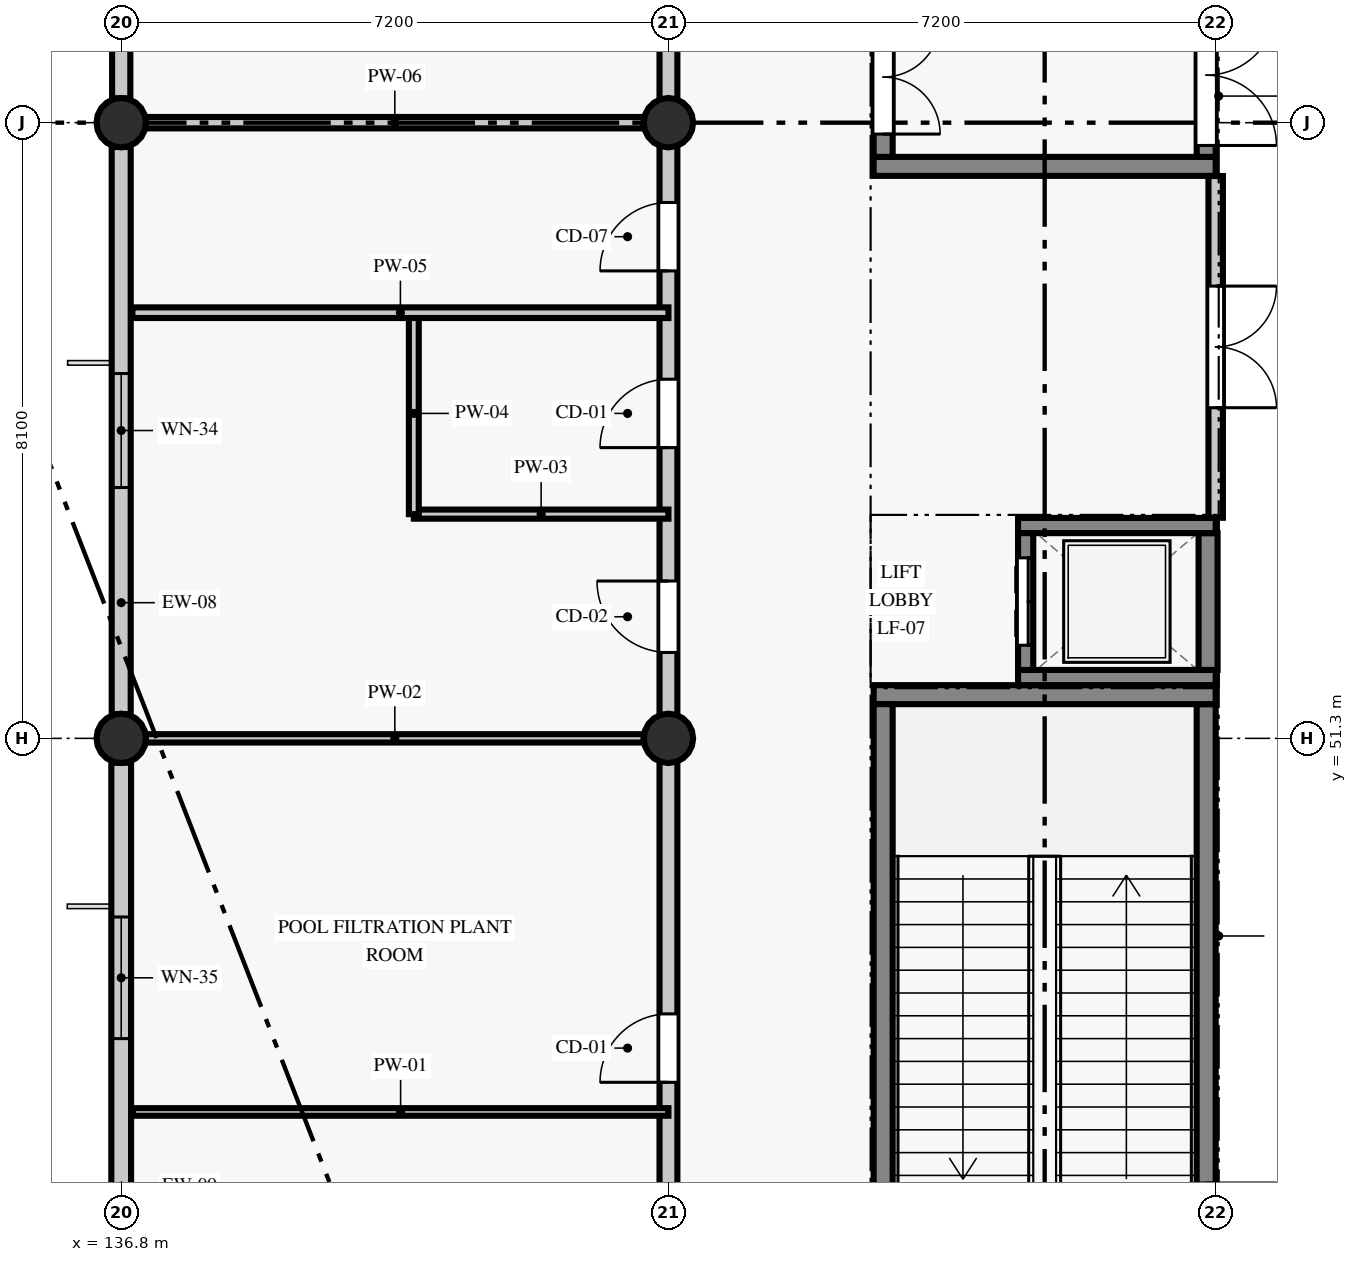
"""IFC4 building model, lengths in metres.
Left out: names, types, materials, properties, quantities, classifications, styles, units other than length and angle.
Written with IfcOpenShell. Run it as: python <this file> out.ifc"""

import sys

from ifc_helpers import new_model, si_unit, direction, frame, frame_2d, origin, origin_2d, place, context, subcontext, project, spatial, rectangle, circle, extrude, element, fill, save


model = new_model("IFC4")
c1 = context("Model", 3, precision=1e-05, world=origin(), true_north=direction((0.0, 1.0)))
c2 = subcontext(c1, "Body", "Model", "MODEL_VIEW")
j1 = project(units=[si_unit("LENGTHUNIT", "METRE"), si_unit("PLANEANGLEUNIT", "RADIAN")], contexts=[c1])
p1 = place(None, origin())
s1 = spatial("IfcSite", under=j1, at=p1, CompositionType="ELEMENT")
p2 = place(p1, origin())
s2 = spatial("IfcBuilding", under=s1, at=p2, CompositionType="ELEMENT")
p3 = place(p2, origin())
s3 = spatial("IfcBuildingStorey", under=s2, at=p3, CompositionType="ELEMENT", Elevation=0.0)
for number, where, z_axis, x_axis in (
    (1, (136.8, 51.3, 0.0), (0.0, 0.0, 1.0), (1.0, 0.0, 0.0)),
    (2, (136.8, 59.4, 0.0), (0.0, 0.0, 1.0), (1.0, 0.0, 0.0)),
    (3, (144.0, 51.3, 0.0), (0.0, 0.0, 1.0), (1.0, 0.0, 0.0)),
    (4, (144.0, 59.4, 0.0), (0.0, 0.0, 1.0), (1.0, 0.0, 0.0)),
):
    element("IfcColumn", number, at=place(p3, frame(where, z_axis=z_axis, x_axis=x_axis)), inside=s3, PredefinedType="COLUMN", context=c2, shape_type="SweptSolid", body=[
        extrude(circle(Radius=0.325, at=origin_2d()), origin(), (0.0, 0.0, 1.0), 4.565),
    ])
p4 = place(p3, frame((151.2, 54.202, 0.0), z_axis=(0.0, 0.0, 1.0), x_axis=(0.0, 1.0, 0.0)))
e5 = element("IfcWall", 5, at=p4, inside=s3, PredefinedType="STANDARD", context=c2, shape_type="SweptSolid", body=[
    extrude(rectangle(XDim=4.496, YDim=0.19, at=frame_2d((2.248, 0.0))), origin(), (0.0, 0.0, 1.0), 4.565),
])
p5 = place(p4, frame((1.448, 0.0, 0.0)))
e6 = element("IfcOpeningElement", 6, at=p5, cuts=e5, PredefinedType="OPENING", context=c2, shape_type="SweptSolid", body=[
    extrude(rectangle(XDim=1.6, YDim=2.2, at=frame_2d((0.8, 1.1))), frame((0.0, 0.105, 0.0), z_axis=(0.0, -1.0, 0.0), x_axis=(1.0, 0.0, 0.0)), (0.0, 0.0, 1.0), 0.21),
])
p6 = place(p3, frame((136.8, 67.18, 0.0), z_axis=(0.0, 0.0, 1.0), x_axis=(0.0, -1.0, 0.0)))
e7 = element("IfcWall", 7, at=p6, inside=s3, PredefinedType="STANDARD", context=c2, shape_type="SweptSolid", body=[
    extrude(rectangle(XDim=7.46, YDim=0.24, at=frame_2d((3.73, 0.0))), origin(), (0.0, 0.0, 1.0), 3.915),
])
p7 = place(p6, frame((3.03, 0.0, 0.9)))
e8 = element("IfcOpeningElement", 8, at=p7, cuts=e7, PredefinedType="OPENING", context=c2, shape_type="SweptSolid", body=[
    extrude(rectangle(XDim=1.4, YDim=1.66, at=frame_2d((0.7, 0.83))), frame((0.0, 0.13, 0.0), z_axis=(0.0, -1.0, 0.0), x_axis=(1.0, 0.0, 0.0)), (0.0, 0.0, 1.0), 0.26),
])
p8 = place(p3, frame((136.8, 59.08, 0.0), z_axis=(0.0, 0.0, 1.0), x_axis=(0.0, -1.0, 0.0)))
e9 = element("IfcWall", 9, at=p8, inside=s3, PredefinedType="STANDARD", context=c2, shape_type="SweptSolid", body=[
    extrude(rectangle(XDim=7.46, YDim=0.25, at=frame_2d((3.73, 0.0))), origin(), (0.0, 0.0, 1.0), 3.915),
])
p9 = place(p8, frame((2.98, 0.0, 0.9)))
e10 = element("IfcOpeningElement", 10, at=p9, cuts=e9, PredefinedType="OPENING", context=c2, shape_type="SweptSolid", body=[
    extrude(rectangle(XDim=1.5, YDim=1.66, at=frame_2d((0.75, 0.83))), frame((0.0, 0.135, 0.0), z_axis=(0.0, -1.0, 0.0), x_axis=(1.0, 0.0, 0.0)), (0.0, 0.0, 1.0), 0.27),
])
p10 = place(p3, frame((136.8, 50.98, 0.0), z_axis=(0.0, 0.0, 1.0), x_axis=(0.0, -1.0, 0.0)))
e11 = element("IfcWall", 11, at=p10, inside=s3, PredefinedType="STANDARD", context=c2, shape_type="SweptSolid", body=[
    extrude(rectangle(XDim=7.46, YDim=0.26, at=frame_2d((3.73, 0.0))), origin(), (0.0, 0.0, 1.0), 3.915),
])
p11 = place(p10, frame((2.03, 0.0, 0.9)))
e12 = element("IfcOpeningElement", 12, at=p11, cuts=e11, PredefinedType="OPENING", context=c2, shape_type="SweptSolid", body=[
    extrude(rectangle(XDim=1.6, YDim=1.66, at=frame_2d((0.8, 0.83))), frame((0.0, 0.14, 0.0), z_axis=(0.0, -1.0, 0.0), x_axis=(1.0, 0.0, 0.0)), (0.0, 0.0, 1.0), 0.28),
])
p12 = place(p3, frame((151.075, 43.45, 0.0), z_axis=(0.0, 0.0, 1.0), x_axis=(0.0, 1.0, 0.0)))
e13 = element("IfcWall", 13, at=p12, inside=s3, PredefinedType="SHEAR", context=c2, shape_type="SweptSolid", body=[
    extrude(rectangle(XDim=8.3, YDim=0.25, at=frame_2d((4.15, 0.0))), origin(), (0.0, 0.0, 1.0), 4.565),
])
p13 = place(p12, frame((0.15, 0.0, 0.0)))
e14 = element("IfcOpeningElement", 14, at=p13, cuts=e13, PredefinedType="OPENING", context=c2, shape_type="SweptSolid", body=[
    extrude(rectangle(XDim=1.85, YDim=2.2, at=frame_2d((0.925, 1.1))), frame((0.0, 0.135, 0.0), z_axis=(0.0, -1.0, 0.0), x_axis=(1.0, 0.0, 0.0)), (0.0, 0.0, 1.0), 0.27),
])
p14 = place(p3, frame((151.2, 51.875, 0.0), z_axis=(0.0, 0.0, 1.0), x_axis=(-1.0, 0.0, 0.0)))
e15 = element("IfcWall", 15, at=p14, inside=s3, PredefinedType="SHEAR", context=c2, shape_type="SweptSolid", body=[
    extrude(rectangle(XDim=4.5, YDim=0.25, at=frame_2d((2.25, 0.0))), origin(), (0.0, 0.0, 1.0), 4.565),
])
p15 = place(p3, frame((146.825, 51.75, 0.0), z_axis=(0.0, 0.0, 1.0), x_axis=(0.0, -1.0, 0.0)))
e16 = element("IfcWall", 16, at=p15, inside=s3, PredefinedType="SHEAR", context=c2, shape_type="SweptSolid", body=[
    extrude(rectangle(XDim=8.3, YDim=0.25, at=frame_2d((4.15, 0.0))), origin(), (0.0, 0.0, 1.0), 4.565),
])
p16 = place(p15, frame((6.5, 0.0, 0.0)))
e17 = element("IfcOpeningElement", 17, at=p16, cuts=e16, PredefinedType="OPENING", context=c2, shape_type="SweptSolid", body=[
    extrude(rectangle(XDim=1.5, YDim=2.15, at=frame_2d((0.75, 1.075))), frame((0.0, 0.135, 0.0), z_axis=(0.0, -1.0, 0.0), x_axis=(1.0, 0.0, 0.0)), (0.0, 0.0, 1.0), 0.27),
])
p17 = place(p3, frame((146.7, 58.825, 0.0), z_axis=(0.0, 0.0, 1.0), x_axis=(1.0, 0.0, 0.0)))
e18 = element("IfcWall", 18, at=p17, inside=s3, PredefinedType="SHEAR", context=c2, shape_type="SweptSolid", body=[
    extrude(rectangle(XDim=4.5, YDim=0.25, at=frame_2d((2.25, 0.0))), origin(), (0.0, 0.0, 1.0), 4.565),
])
p18 = place(p3, frame((151.075, 58.95, 0.0), z_axis=(0.0, 0.0, 1.0), x_axis=(0.0, 1.0, 0.0)))
e19 = element("IfcWall", 19, at=p18, inside=s3, PredefinedType="SHEAR", context=c2, shape_type="SweptSolid", body=[
    extrude(rectangle(XDim=8.3, YDim=0.25, at=frame_2d((4.15, 0.0))), origin(), (0.0, 0.0, 1.0), 4.565),
])
p19 = place(p18, frame((0.15, 0.0, 0.0)))
e20 = element("IfcOpeningElement", 20, at=p19, cuts=e19, PredefinedType="OPENING", context=c2, shape_type="SweptSolid", body=[
    extrude(rectangle(XDim=1.85, YDim=2.2, at=frame_2d((0.925, 1.1))), frame((0.0, 0.135, 0.0), z_axis=(0.0, -1.0, 0.0), x_axis=(1.0, 0.0, 0.0)), (0.0, 0.0, 1.0), 0.27),
])
p20 = place(p3, frame((146.825, 67.25, 0.0), z_axis=(0.0, 0.0, 1.0), x_axis=(0.0, -1.0, 0.0)))
e21 = element("IfcWall", 21, at=p20, inside=s3, PredefinedType="SHEAR", context=c2, shape_type="SweptSolid", body=[
    extrude(rectangle(XDim=8.3, YDim=0.25, at=frame_2d((4.15, 0.0))), origin(), (0.0, 0.0, 1.0), 4.565),
])
p21 = place(p20, frame((6.5, 0.0, 0.0)))
e22 = element("IfcOpeningElement", 22, at=p21, cuts=e21, PredefinedType="OPENING", context=c2, shape_type="SweptSolid", body=[
    extrude(rectangle(XDim=1.5, YDim=2.15, at=frame_2d((0.75, 1.075))), frame((0.0, 0.135, 0.0), z_axis=(0.0, -1.0, 0.0), x_axis=(1.0, 0.0, 0.0)), (0.0, 0.0, 1.0), 0.27),
])
p22 = place(p3, frame((148.6, 52.1, 0.0), z_axis=(0.0, 0.0, 1.0), x_axis=(1.0, 0.0, 0.0)))
e23 = element("IfcWall", 23, at=p22, inside=s3, PredefinedType="SHEAR", context=c2, shape_type="SweptSolid", body=[
    extrude(rectangle(XDim=2.6, YDim=0.2, at=frame_2d((1.3, 0.0))), origin(), (0.0, 0.0, 1.0), 4.565),
])
p23 = place(p3, frame((151.1, 52.2, 0.0), z_axis=(0.0, 0.0, 1.0), x_axis=(0.0, 1.0, 0.0)))
e24 = element("IfcWall", 24, at=p23, inside=s3, PredefinedType="SHEAR", context=c2, shape_type="SweptSolid", body=[
    extrude(rectangle(XDim=1.8, YDim=0.25, at=frame_2d((0.9, 0.0))), origin(), (0.0, 0.0, 1.0), 4.565),
])
p24 = place(p3, frame((151.2, 54.1, 0.0), z_axis=(0.0, 0.0, 1.0), x_axis=(-1.0, 0.0, 0.0)))
e25 = element("IfcWall", 25, at=p24, inside=s3, PredefinedType="SHEAR", context=c2, shape_type="SweptSolid", body=[
    extrude(rectangle(XDim=2.6, YDim=0.2, at=frame_2d((1.3, 0.0))), origin(), (0.0, 0.0, 1.0), 4.565),
])
p25 = place(p3, frame((148.7, 54.0, 0.0), z_axis=(0.0, 0.0, 1.0), x_axis=(0.0, -1.0, 0.0)))
e26 = element("IfcWall", 26, at=p25, inside=s3, PredefinedType="SHEAR", context=c2, shape_type="SweptSolid", body=[
    extrude(rectangle(XDim=1.8, YDim=0.2, at=frame_2d((0.9, 0.0))), origin(), (0.0, 0.0, 1.0), 4.565),
])
p26 = place(p25, frame((0.325, 0.0, 0.0)))
e27 = element("IfcOpeningElement", 27, at=p26, cuts=e26, PredefinedType="OPENING", context=c2, shape_type="SweptSolid", body=[
    extrude(rectangle(XDim=1.15, YDim=2.15, at=frame_2d((0.575, 1.075))), frame((0.0, 0.11, 0.0), z_axis=(0.0, -1.0, 0.0), x_axis=(1.0, 0.0, 0.0)), (0.0, 0.0, 1.0), 0.22),
])
p27 = place(p3, frame((144.0, 36.325, 0.0), z_axis=(0.0, 0.0, 1.0), x_axis=(0.0, 1.0, 0.0)))
e28 = element("IfcWall", 28, at=p27, inside=s3, PredefinedType="PARTITIONING", context=c2, shape_type="SweptSolid", body=[
    extrude(rectangle(XDim=38.95, YDim=0.235, at=frame_2d((19.475, 0.0))), origin(), (0.0, 0.0, 1.0), 4.115),
])
p28 = place(p27, frame((2.045, 0.0, 0.0)))
e29 = element("IfcOpeningElement", 29, at=p28, cuts=e28, PredefinedType="OPENING", context=c2, shape_type="SweptSolid", body=[
    extrude(rectangle(XDim=1.62, YDim=2.22, at=frame_2d((0.81, 1.11))), frame((0.0, 0.127, 0.0), z_axis=(0.0, -1.0, 0.0), x_axis=(1.0, 0.0, 0.0)), (0.0, 0.0, 1.0), 0.255),
])
p29 = place(p27, frame((10.45, 0.0, 0.0)))
e30 = element("IfcOpeningElement", 30, at=p29, cuts=e28, PredefinedType="OPENING", context=c2, shape_type="SweptSolid", body=[
    extrude(rectangle(XDim=0.9, YDim=2.08, at=frame_2d((0.45, 1.04))), frame((0.0, 0.127, 0.0), z_axis=(0.0, -1.0, 0.0), x_axis=(1.0, 0.0, 0.0)), (0.0, 0.0, 1.0), 0.255),
])
p30 = place(p27, frame((16.105, 0.0, 0.0)))
e31 = element("IfcOpeningElement", 31, at=p30, cuts=e28, PredefinedType="OPENING", context=c2, shape_type="SweptSolid", body=[
    extrude(rectangle(XDim=0.94, YDim=2.08, at=frame_2d((0.47, 1.04))), frame((0.0, 0.127, 0.0), z_axis=(0.0, -1.0, 0.0), x_axis=(1.0, 0.0, 0.0)), (0.0, 0.0, 1.0), 0.255),
])
p31 = place(p27, frame((18.8, 0.0, 0.0)))
e32 = element("IfcOpeningElement", 32, at=p31, cuts=e28, PredefinedType="OPENING", context=c2, shape_type="SweptSolid", body=[
    extrude(rectangle(XDim=0.9, YDim=2.08, at=frame_2d((0.45, 1.04))), frame((0.0, 0.127, 0.0), z_axis=(0.0, -1.0, 0.0), x_axis=(1.0, 0.0, 0.0)), (0.0, 0.0, 1.0), 0.255),
])
p32 = place(p27, frame((21.125, 0.0, 0.0)))
e33 = element("IfcOpeningElement", 33, at=p32, cuts=e28, PredefinedType="OPENING", context=c2, shape_type="SweptSolid", body=[
    extrude(rectangle(XDim=0.9, YDim=2.13, at=frame_2d((0.45, 1.065))), frame((0.0, 0.127, 0.0), z_axis=(0.0, -1.0, 0.0), x_axis=(1.0, 0.0, 0.0)), (0.0, 0.0, 1.0), 0.255),
])
p33 = place(p27, frame((25.925, 0.0, 0.0)))
e34 = element("IfcOpeningElement", 34, at=p33, cuts=e28, PredefinedType="OPENING", context=c2, shape_type="SweptSolid", body=[
    extrude(rectangle(XDim=1.68, YDim=2.24, at=frame_2d((0.84, 1.12))), frame((0.0, 0.127, 0.0), z_axis=(0.0, -1.0, 0.0), x_axis=(1.0, 0.0, 0.0)), (0.0, 0.0, 1.0), 0.255),
])
p34 = place(p27, frame((34.515, 0.0, 0.0)))
e35 = element("IfcOpeningElement", 35, at=p34, cuts=e28, PredefinedType="OPENING", context=c2, shape_type="SweptSolid", body=[
    extrude(rectangle(XDim=1.06, YDim=2.08, at=frame_2d((0.53, 1.04))), frame((0.0, 0.127, 0.0), z_axis=(0.0, -1.0, 0.0), x_axis=(1.0, 0.0, 0.0)), (0.0, 0.0, 1.0), 0.255),
])
p35 = place(p3, frame((136.952, 46.385, 0.0), z_axis=(0.0, 0.0, 1.0), x_axis=(1.0, 0.0, 0.0)))
e36 = element("IfcWall", 36, at=p35, inside=s3, PredefinedType="PARTITIONING", context=c2, shape_type="SweptSolid", body=[
    extrude(rectangle(XDim=7.048, YDim=0.1, at=frame_2d((3.524, 0.0))), origin(), (0.0, 0.0, 1.0), 4.565),
])
p36 = place(p3, frame((137.125, 51.3, 0.0), z_axis=(0.0, 0.0, 1.0), x_axis=(1.0, 0.0, 0.0)))
e37 = element("IfcWall", 37, at=p36, inside=s3, PredefinedType="PARTITIONING", context=c2, shape_type="SweptSolid", body=[
    extrude(rectangle(XDim=6.55, YDim=0.11, at=frame_2d((3.275, 0.0))), origin(), (0.0, 0.0, 1.0), 3.865),
])
p37 = place(p3, frame((140.65, 54.25, 0.0), z_axis=(0.0, 0.0, 1.0), x_axis=(1.0, 0.0, 0.0)))
e38 = element("IfcWall", 38, at=p37, inside=s3, PredefinedType="PARTITIONING", context=c2, shape_type="SweptSolid", body=[
    extrude(rectangle(XDim=3.35, YDim=0.12, at=frame_2d((1.675, 0.0))), origin(), (0.0, 0.0, 1.0), 4.565),
])
p38 = place(p3, frame((140.65, 54.25, 0.0), z_axis=(0.0, 0.0, 1.0), x_axis=(0.0, 1.0, 0.0)))
e39 = element("IfcWall", 39, at=p38, inside=s3, PredefinedType="PARTITIONING", context=c2, shape_type="SweptSolid", body=[
    extrude(rectangle(XDim=2.65, YDim=0.13, at=frame_2d((1.325, 0.0))), origin(), (0.0, 0.0, 1.0), 4.205),
])
p39 = place(p3, frame((136.947, 56.9, 0.0), z_axis=(0.0, 0.0, 1.0), x_axis=(1.0, 0.0, 0.0)))
e40 = element("IfcWall", 40, at=p39, inside=s3, PredefinedType="PARTITIONING", context=c2, shape_type="SweptSolid", body=[
    extrude(rectangle(XDim=7.053, YDim=0.14, at=frame_2d((3.526, 0.0))), origin(), (0.0, 0.0, 1.0), 4.565),
])
p40 = place(p3, frame((137.125, 59.4, 0.0), z_axis=(0.0, 0.0, 1.0), x_axis=(1.0, 0.0, 0.0)))
e41 = element("IfcWall", 41, at=p40, inside=s3, PredefinedType="PARTITIONING", context=c2, shape_type="SweptSolid", body=[
    extrude(rectangle(XDim=6.55, YDim=0.15, at=frame_2d((3.275, 0.0))), origin(), (0.0, 0.0, 1.0), 3.865),
])
p41 = place(p5, frame((1.6, 0.0, 0.0), z_axis=(0.0, 0.0, 1.0), x_axis=(-1.0, 0.0, 0.0)))
e42 = element("IfcDoor", 42, at=p41, inside=s3, OperationType="DOUBLE_DOOR_SINGLE_SWING", PredefinedType="DOOR", context=c2, shape_type="SweptSolid", body=[
    extrude(rectangle(XDim=1.6, YDim=2.2, at=frame_2d((0.8, 1.1))), frame((0.0, 0.025, 0.0), z_axis=(0.0, -1.0, 0.0), x_axis=(1.0, 0.0, 0.0)), (0.0, 0.0, 1.0), 0.05),
])
fill(e6, e42)
p42 = place(p9, origin())
e43 = element("IfcWindow", 43, at=p42, inside=s3, PartitioningType="SINGLE_PANEL", PredefinedType="WINDOW", context=c2, shape_type="SweptSolid", body=[
    extrude(rectangle(XDim=1.5, YDim=1.66, at=frame_2d((0.75, 0.83))), frame((0.0, 0.03, 0.0), z_axis=(0.0, -1.0, 0.0), x_axis=(1.0, 0.0, 0.0)), (0.0, 0.0, 1.0), 0.06),
])
fill(e10, e43)
p43 = place(p11, origin())
e44 = element("IfcWindow", 44, at=p43, inside=s3, PartitioningType="SINGLE_PANEL", PredefinedType="WINDOW", context=c2, shape_type="SweptSolid", body=[
    extrude(rectangle(XDim=1.6, YDim=1.66, at=frame_2d((0.8, 0.83))), frame((0.0, 0.03, 0.0), z_axis=(0.0, -1.0, 0.0), x_axis=(1.0, 0.0, 0.0)), (0.0, 0.0, 1.0), 0.06),
])
fill(e12, e44)
p44 = place(p19, frame((1.85, 0.0, 0.0), z_axis=(0.0, 0.0, 1.0), x_axis=(-1.0, 0.0, 0.0)))
e45 = element("IfcDoor", 45, at=p44, inside=s3, OperationType="DOUBLE_DOOR_SINGLE_SWING", PredefinedType="DOOR", context=c2, shape_type="SweptSolid", body=[
    extrude(rectangle(XDim=1.85, YDim=2.2, at=frame_2d((0.925, 1.1))), frame((0.0, 0.025, 0.0), z_axis=(0.0, -1.0, 0.0), x_axis=(1.0, 0.0, 0.0)), (0.0, 0.0, 1.0), 0.05),
])
fill(e20, e45)
p45 = place(p21, origin())
e46 = element("IfcDoor", 46, at=p45, inside=s3, OperationType="DOUBLE_DOOR_SINGLE_SWING", PredefinedType="DOOR", context=c2, shape_type="SweptSolid", body=[
    extrude(rectangle(XDim=1.5, YDim=2.15, at=frame_2d((0.75, 1.075))), frame((0.0, 0.025, 0.0), z_axis=(0.0, -1.0, 0.0), x_axis=(1.0, 0.0, 0.0)), (0.0, 0.0, 1.0), 0.05),
])
fill(e22, e46)
p46 = place(p26, frame((1.15, 0.0, 0.0), z_axis=(0.0, 0.0, 1.0), x_axis=(-1.0, 0.0, 0.0)))
e47 = element("IfcDoor", 47, at=p46, inside=s3, OperationType="DOUBLE_DOOR_SLIDING", PredefinedType="DOOR", context=c2, shape_type="SweptSolid", body=[
    extrude(rectangle(XDim=1.15, YDim=2.15, at=frame_2d((0.575, 1.075))), frame((0.0, 0.025, 0.0), z_axis=(0.0, -1.0, 0.0), x_axis=(1.0, 0.0, 0.0)), (0.0, 0.0, 1.0), 0.05),
])
fill(e27, e47)
p47 = place(p29, origin())
e48 = element("IfcDoor", 48, at=p47, inside=s3, OperationType="SINGLE_SWING_LEFT", PredefinedType="DOOR", context=c2, shape_type="SweptSolid", body=[
    extrude(rectangle(XDim=0.9, YDim=2.08, at=frame_2d((0.45, 1.04))), frame((0.0, 0.025, 0.0), z_axis=(0.0, -1.0, 0.0), x_axis=(1.0, 0.0, 0.0)), (0.0, 0.0, 1.0), 0.05),
])
fill(e30, e48)
p48 = place(p30, origin())
e49 = element("IfcDoor", 49, at=p48, inside=s3, OperationType="SINGLE_SWING_RIGHT", PredefinedType="DOOR", context=c2, shape_type="SweptSolid", body=[
    extrude(rectangle(XDim=0.94, YDim=2.08, at=frame_2d((0.47, 1.04))), frame((0.0, 0.025, 0.0), z_axis=(0.0, -1.0, 0.0), x_axis=(1.0, 0.0, 0.0)), (0.0, 0.0, 1.0), 0.05),
])
fill(e31, e49)
p49 = place(p31, origin())
e50 = element("IfcDoor", 50, at=p49, inside=s3, OperationType="SINGLE_SWING_LEFT", PredefinedType="DOOR", context=c2, shape_type="SweptSolid", body=[
    extrude(rectangle(XDim=0.9, YDim=2.08, at=frame_2d((0.45, 1.04))), frame((0.0, 0.025, 0.0), z_axis=(0.0, -1.0, 0.0), x_axis=(1.0, 0.0, 0.0)), (0.0, 0.0, 1.0), 0.05),
])
fill(e32, e50)
p50 = place(p32, origin())
e51 = element("IfcDoor", 51, at=p50, inside=s3, OperationType="SINGLE_SWING_LEFT", PredefinedType="DOOR", context=c2, shape_type="SweptSolid", body=[
    extrude(rectangle(XDim=0.9, YDim=2.13, at=frame_2d((0.45, 1.065))), frame((0.0, 0.025, 0.0), z_axis=(0.0, -1.0, 0.0), x_axis=(1.0, 0.0, 0.0)), (0.0, 0.0, 1.0), 0.05),
])
fill(e33, e51)
save(model, sys.argv[1])
